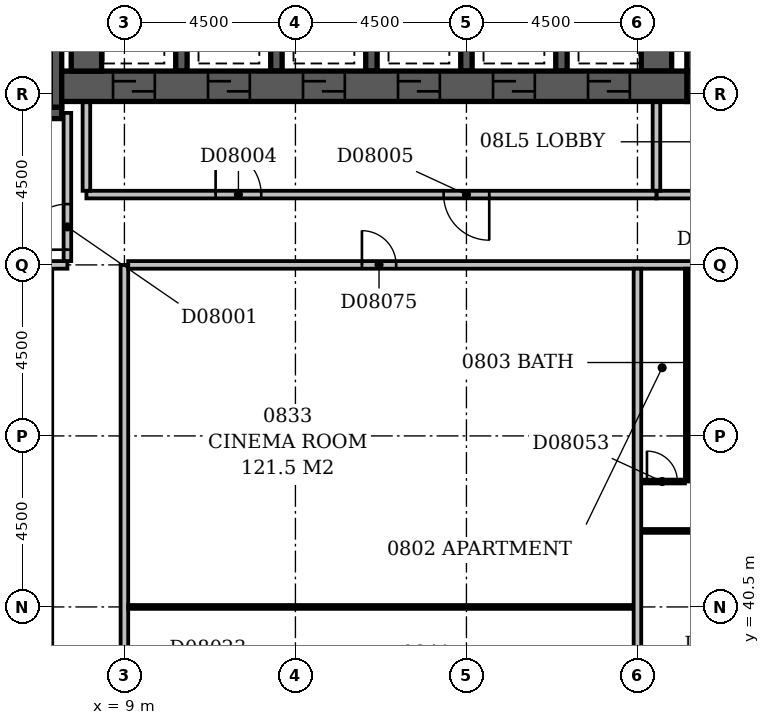
"""IFC4 building model, lengths in metres.
Left out: names, types, materials, properties, quantities, classifications, styles, units other than length and angle.
Written with IfcOpenShell. Run it as: python <this file> out.ifc"""

import sys

from ifc_helpers import new_model, si_unit, direction, frame, frame_2d, origin, place, context, subcontext, project, spatial, rectangle, extrude, element, fill, save


model = new_model("IFC4")
c1 = context("Model", 3, precision=1e-05, world=origin(), true_north=direction((0.0, 1.0)))
c2 = subcontext(c1, "Body", "Model", "MODEL_VIEW")
j1 = project(units=[si_unit("LENGTHUNIT", "METRE"), si_unit("PLANEANGLEUNIT", "RADIAN")], contexts=[c1])
p1 = place(None, origin())
s1 = spatial("IfcSite", under=j1, at=p1, CompositionType="ELEMENT")
p2 = place(p1, origin())
s2 = spatial("IfcBuilding", under=s1, at=p2, CompositionType="ELEMENT")
p3 = place(p2, frame((0.0, 0.0, 39.8)))
s3 = spatial("IfcBuildingStorey", under=s2, at=p3, CompositionType="ELEMENT", Elevation=39.8)
p4 = place(p3, frame((0.35, 53.5, -0.3), z_axis=(0.0, 0.0, 1.0), x_axis=(1.0, 0.0, 0.0)))
e1 = element("IfcWall", 1, at=p4, inside=s3, PredefinedType="SHEAR", context=c2, shape_type="SweptSolid", body=[
    extrude(rectangle(XDim=7.0, YDim=0.3, at=frame_2d((3.5, 0.0))), origin(), (0.0, 0.0, 1.0), 3.6),
])
p5 = place(p4, frame((5.58, 0.0, 0.3)))
e2 = element("IfcOpeningElement", 2, at=p5, cuts=e1, PredefinedType="OPENING", context=c2, shape_type="SweptSolid", body=[
    extrude(rectangle(XDim=1.1, YDim=2.1, at=frame_2d((0.55, 1.05))), frame((0.0, 0.162, 0.0), z_axis=(0.0, -1.0, 0.0), x_axis=(1.0, 0.0, 0.0)), (0.0, 0.0, 1.0), 0.324),
])
p6 = place(p3, frame((7.2, 53.65, -0.3), z_axis=(0.0, 0.0, 1.0), x_axis=(0.0, 1.0, 0.0)))
e3 = element("IfcWall", 3, at=p6, inside=s3, PredefinedType="SHEAR", context=c2, shape_type="SweptSolid", body=[
    extrude(rectangle(XDim=4.2, YDim=0.3, at=frame_2d((2.1, 0.0))), origin(), (0.0, 0.0, 1.0), 3.6),
])
p7 = place(p3, frame((7.35, 54.2, -0.3), z_axis=(0.0, 0.0, 1.0), x_axis=(1.0, 0.0, 0.0)))
e4 = element("IfcWall", 4, at=p7, inside=s3, PredefinedType="SHEAR", context=c2, shape_type="SweptSolid", body=[
    extrude(rectangle(XDim=16.45, YDim=0.8, at=frame_2d((8.225, 0.0))), origin(), (0.0, 0.0, 1.0), 3.6),
])
p8 = place(p7, frame((1.35, 0.0, 0.3)))
e5 = element("IfcOpeningElement", 5, at=p8, cuts=e4, PredefinedType="OPENING", context=c2, shape_type="SweptSolid", body=[
    extrude(rectangle(XDim=1.1, YDim=2.1, at=frame_2d((0.55, 1.05))), frame((0.0, 0.412, 0.0), z_axis=(0.0, -1.0, 0.0), x_axis=(1.0, 0.0, 0.0)), (0.0, 0.0, 1.0), 0.824),
])
p9 = place(p7, frame((3.85, 0.0, 0.3)))
e6 = element("IfcOpeningElement", 6, at=p9, cuts=e4, PredefinedType="OPENING", context=c2, shape_type="SweptSolid", body=[
    extrude(rectangle(XDim=1.1, YDim=2.1, at=frame_2d((0.55, 1.05))), frame((0.0, 0.412, 0.0), z_axis=(0.0, -1.0, 0.0), x_axis=(1.0, 0.0, 0.0)), (0.0, 0.0, 1.0), 0.824),
])
p10 = place(p7, frame((6.35, 0.0, 0.3)))
e7 = element("IfcOpeningElement", 7, at=p10, cuts=e4, PredefinedType="OPENING", context=c2, shape_type="SweptSolid", body=[
    extrude(rectangle(XDim=1.1, YDim=2.1, at=frame_2d((0.55, 1.05))), frame((0.0, 0.412, 0.0), z_axis=(0.0, -1.0, 0.0), x_axis=(1.0, 0.0, 0.0)), (0.0, 0.0, 1.0), 0.824),
])
p11 = place(p7, frame((8.85, 0.0, 0.3)))
e8 = element("IfcOpeningElement", 8, at=p11, cuts=e4, PredefinedType="OPENING", context=c2, shape_type="SweptSolid", body=[
    extrude(rectangle(XDim=1.1, YDim=2.1, at=frame_2d((0.55, 1.05))), frame((0.0, 0.412, 0.0), z_axis=(0.0, -1.0, 0.0), x_axis=(1.0, 0.0, 0.0)), (0.0, 0.0, 1.0), 0.824),
])
p12 = place(p7, frame((11.35, 0.0, 0.3)))
e9 = element("IfcOpeningElement", 9, at=p12, cuts=e4, PredefinedType="OPENING", context=c2, shape_type="SweptSolid", body=[
    extrude(rectangle(XDim=1.1, YDim=2.1, at=frame_2d((0.55, 1.05))), frame((0.0, 0.412, 0.0), z_axis=(0.0, -1.0, 0.0), x_axis=(1.0, 0.0, 0.0)), (0.0, 0.0, 1.0), 0.824),
])
p13 = place(p7, frame((13.85, 0.0, 0.3)))
e10 = element("IfcOpeningElement", 10, at=p13, cuts=e4, PredefinedType="OPENING", context=c2, shape_type="SweptSolid", body=[
    extrude(rectangle(XDim=1.1, YDim=2.1, at=frame_2d((0.55, 1.05))), frame((0.0, 0.412, 0.0), z_axis=(0.0, -1.0, 0.0), x_axis=(1.0, 0.0, 0.0)), (0.0, 0.0, 1.0), 0.824),
])
p14 = place(p3, frame((8.0, 54.6, -0.3), z_axis=(0.0, 0.0, 1.0), x_axis=(0.0, 1.0, 0.0)))
e11 = element("IfcWall", 11, at=p14, inside=s3, PredefinedType="SHEAR", context=c2, shape_type="SweptSolid", body=[
    extrude(rectangle(XDim=3.0, YDim=0.8, at=frame_2d((1.5, 0.0))), origin(), (0.0, 0.0, 1.0), 3.6),
])
for number, where, z_axis, x_axis in (
    (12, (10.5, 54.6, -0.3), (0.0, 0.0, 1.0), (0.0, 1.0, 0.0)),
    (13, (13.0, 54.6, -0.3), (0.0, 0.0, 1.0), (0.0, 1.0, 0.0)),
    (14, (15.5, 54.6, -0.3), (0.0, 0.0, 1.0), (0.0, 1.0, 0.0)),
    (15, (18.0, 54.6, -0.3), (0.0, 0.0, 1.0), (0.0, 1.0, 0.0)),
    (16, (20.5, 54.6, -0.3), (0.0, 0.0, 1.0), (0.0, 1.0, 0.0)),
):
    element("IfcWall", number, at=place(p3, frame(where, z_axis=z_axis, x_axis=x_axis)), inside=s3, PredefinedType="SHEAR", context=c2, shape_type="SweptSolid", body=[
        extrude(rectangle(XDim=3.0, YDim=0.3, at=frame_2d((1.5, 0.0))), origin(), (0.0, 0.0, 1.0), 3.6),
    ])
p15 = place(p3, frame((23.0, 54.6, -0.3), z_axis=(0.0, 0.0, 1.0), x_axis=(0.0, 1.0, 0.0)))
e17 = element("IfcWall", 17, at=p15, inside=s3, PredefinedType="SHEAR", context=c2, shape_type="SweptSolid", body=[
    extrude(rectangle(XDim=3.0, YDim=0.8, at=frame_2d((1.5, 0.0))), origin(), (0.0, 0.0, 1.0), 3.6),
])
p16 = place(p3, frame((23.8, 54.2, -0.3), z_axis=(0.0, 0.0, 1.0), x_axis=(1.0, 0.0, 0.0)))
e18 = element("IfcWall", 18, at=p16, inside=s3, PredefinedType="SHEAR", context=c2, shape_type="SweptSolid", body=[
    extrude(rectangle(XDim=3.3, YDim=0.8, at=frame_2d((1.65, 0.0))), origin(), (0.0, 0.0, 1.0), 3.6),
])
p17 = place(p16, frame((1.1, 0.0, 0.3)))
e19 = element("IfcOpeningElement", 19, at=p17, cuts=e18, PredefinedType="OPENING", context=c2, shape_type="SweptSolid", body=[
    extrude(rectangle(XDim=1.1, YDim=2.1, at=frame_2d((0.55, 1.05))), frame((0.0, 0.412, 0.0), z_axis=(0.0, -1.0, 0.0), x_axis=(1.0, 0.0, 0.0)), (0.0, 0.0, 1.0), 0.824),
])
p18 = place(p3, frame((24.2, 54.6, -0.3), z_axis=(0.0, 0.0, 1.0), x_axis=(0.0, 1.0, 0.0)))
e20 = element("IfcWall", 20, at=p18, inside=s3, PredefinedType="SHEAR", context=c2, shape_type="SweptSolid", body=[
    extrude(rectangle(XDim=3.0, YDim=0.8, at=frame_2d((1.5, 0.0))), origin(), (0.0, 0.0, 1.0), 3.6),
])
p19 = place(p3, frame((8.0, 51.35, 0.0), z_axis=(0.0, 0.0, 1.0), x_axis=(1.0, 0.0, 0.0)))
e21 = element("IfcWall", 21, at=p19, inside=s3, PredefinedType="PARTITIONING", context=c2, shape_type="SweptSolid", body=[
    extrude(rectangle(XDim=15.0, YDim=0.2, at=frame_2d((7.5, 0.0))), origin(), (0.0, 0.0, 1.0), 3.3),
])
p20 = place(p19, frame((3.4, 0.0, 0.0)))
e22 = element("IfcOpeningElement", 22, at=p20, cuts=e21, PredefinedType="OPENING", context=c2, shape_type="SweptSolid", body=[
    extrude(rectangle(XDim=1.2, YDim=2.1, at=frame_2d((0.6, 1.05))), frame((0.0, 0.112, 0.0), z_axis=(0.0, -1.0, 0.0), x_axis=(1.0, 0.0, 0.0)), (0.0, 0.0, 1.0), 0.224),
])
p21 = place(p19, frame((9.4, 0.0, 0.0)))
e23 = element("IfcOpeningElement", 23, at=p21, cuts=e21, PredefinedType="OPENING", context=c2, shape_type="SweptSolid", body=[
    extrude(rectangle(XDim=1.2, YDim=2.1, at=frame_2d((0.6, 1.05))), frame((0.0, 0.112, 0.0), z_axis=(0.0, -1.0, 0.0), x_axis=(1.0, 0.0, 0.0)), (0.0, 0.0, 1.0), 0.224),
])
for number, where, z_axis, x_axis in (
    (24, (23.0, 51.45, 0.0), (0.0, 0.0, 1.0), (0.0, 1.0, 0.0)),
    (25, (8.0, 51.45, 0.0), (0.0, 0.0, 1.0), (0.0, 1.0, 0.0)),
):
    element("IfcWall", number, at=place(p3, frame(where, z_axis=z_axis, x_axis=x_axis)), inside=s3, PredefinedType="PARTITIONING", context=c2, shape_type="SweptSolid", body=[
        extrude(rectangle(XDim=2.33, YDim=0.2, at=frame_2d((1.165, 0.0))), origin(), (0.0, 0.0, 1.0), 3.3),
    ])
p22 = place(p3, frame((23.0, 51.35, 0.0), z_axis=(0.0, 0.0, 1.0), x_axis=(1.0, 0.0, 0.0)))
e26 = element("IfcWall", 26, at=p22, inside=s3, PredefinedType="PARTITIONING", context=c2, shape_type="SweptSolid", body=[
    extrude(rectangle(XDim=4.8, YDim=0.2, at=frame_2d((2.4, 0.0))), origin(), (0.0, 0.0, 1.0), 3.3),
])
p23 = place(p22, frame((1.65, 0.0, 0.0)))
e27 = element("IfcOpeningElement", 27, at=p23, cuts=e26, PredefinedType="OPENING", context=c2, shape_type="SweptSolid", body=[
    extrude(rectangle(XDim=1.2, YDim=2.1, at=frame_2d((0.6, 1.05))), frame((0.0, 0.112, 0.0), z_axis=(0.0, -1.0, 0.0), x_axis=(1.0, 0.0, 0.0)), (0.0, 0.0, 1.0), 0.224),
])
p24 = place(p3, frame((0.5, 49.5, 0.0), z_axis=(0.0, 0.0, 1.0), x_axis=(1.0, 0.0, 0.0)))
e28 = element("IfcWall", 28, at=p24, inside=s3, PredefinedType="PARTITIONING", context=c2, shape_type="SweptSolid", body=[
    extrude(rectangle(XDim=7.0, YDim=0.2, at=frame_2d((3.5, 0.0))), origin(), (0.0, 0.0, 1.0), 3.3),
])
p25 = place(p3, frame((7.5, 49.6, 0.0), z_axis=(0.0, 0.0, 1.0), x_axis=(0.0, 1.0, 0.0)))
e29 = element("IfcWall", 29, at=p25, inside=s3, PredefinedType="PARTITIONING", context=c2, shape_type="SweptSolid", body=[
    extrude(rectangle(XDim=3.9, YDim=0.2, at=frame_2d((1.95, 0.0))), origin(), (0.0, 0.0, 1.0), 3.3),
])
p26 = place(p25, frame((0.3, 0.0, 0.0)))
e30 = element("IfcOpeningElement", 30, at=p26, cuts=e29, PredefinedType="OPENING", context=c2, shape_type="SweptSolid", body=[
    extrude(rectangle(XDim=1.2, YDim=2.1, at=frame_2d((0.6, 1.05))), frame((0.0, 0.112, 0.0), z_axis=(0.0, -1.0, 0.0), x_axis=(1.0, 0.0, 0.0)), (0.0, 0.0, 1.0), 0.224),
])
p27 = place(p3, frame((9.0, 5.0, 0.0), z_axis=(0.0, 0.0, 1.0), x_axis=(0.0, 1.0, 0.0)))
e31 = element("IfcWall", 31, at=p27, inside=s3, PredefinedType="PARTITIONING", context=c2, shape_type="SweptSolid", body=[
    extrude(rectangle(XDim=44.5, YDim=0.2, at=frame_2d((22.25, 0.0))), origin(), (0.0, 0.0, 1.0), 3.3),
])
p28 = place(p27, frame((17.8, 0.0, 0.0)))
e32 = element("IfcOpeningElement", 32, at=p28, cuts=e31, PredefinedType="OPENING", context=c2, shape_type="SweptSolid", body=[
    extrude(rectangle(XDim=1.0, YDim=2.1, at=frame_2d((0.5, 1.05))), frame((0.0, 0.112, 0.0), z_axis=(0.0, -1.0, 0.0), x_axis=(1.0, 0.0, 0.0)), (0.0, 0.0, 1.0), 0.224),
])
p29 = place(p27, frame((14.95, 0.0, 0.0)))
e33 = element("IfcOpeningElement", 33, at=p29, cuts=e31, PredefinedType="OPENING", context=c2, shape_type="SweptSolid", body=[
    extrude(rectangle(XDim=1.0, YDim=2.1, at=frame_2d((0.5, 1.05))), frame((0.0, 0.112, 0.0), z_axis=(0.0, -1.0, 0.0), x_axis=(1.0, 0.0, 0.0)), (0.0, 0.0, 1.0), 0.224),
])
p30 = place(p27, frame((10.45, 0.0, 0.0)))
e34 = element("IfcOpeningElement", 34, at=p30, cuts=e31, PredefinedType="OPENING", context=c2, shape_type="SweptSolid", body=[
    extrude(rectangle(XDim=1.0, YDim=2.1, at=frame_2d((0.5, 1.05))), frame((0.0, 0.112, 0.0), z_axis=(0.0, -1.0, 0.0), x_axis=(1.0, 0.0, 0.0)), (0.0, 0.0, 1.0), 0.224),
])
p31 = place(p27, frame((5.95, 0.0, 0.0)))
e35 = element("IfcOpeningElement", 35, at=p31, cuts=e31, PredefinedType="OPENING", context=c2, shape_type="SweptSolid", body=[
    extrude(rectangle(XDim=1.0, YDim=2.1, at=frame_2d((0.5, 1.05))), frame((0.0, 0.112, 0.0), z_axis=(0.0, -1.0, 0.0), x_axis=(1.0, 0.0, 0.0)), (0.0, 0.0, 1.0), 0.224),
])
p32 = place(p27, frame((32.75, 0.0, 0.0)))
e36 = element("IfcOpeningElement", 36, at=p32, cuts=e31, PredefinedType="OPENING", context=c2, shape_type="SweptSolid", body=[
    extrude(rectangle(XDim=0.9, YDim=2.1, at=frame_2d((0.45, 1.05))), frame((0.0, 0.112, 0.0), z_axis=(0.0, -1.0, 0.0), x_axis=(1.0, 0.0, 0.0)), (0.0, 0.0, 1.0), 0.224),
])
p33 = place(p27, frame((1.5, 0.0, 0.0)))
e37 = element("IfcOpeningElement", 37, at=p33, cuts=e31, PredefinedType="OPENING", context=c2, shape_type="SweptSolid", body=[
    extrude(rectangle(XDim=0.9, YDim=2.1, at=frame_2d((0.45, 1.05))), frame((0.0, 0.112, 0.0), z_axis=(0.0, -1.0, 0.0), x_axis=(1.0, 0.0, 0.0)), (0.0, 0.0, 1.0), 0.224),
])
p34 = place(p3, frame((22.5, 36.6, 0.0), z_axis=(0.0, 0.0, 1.0), x_axis=(0.0, 1.0, 0.0)))
e38 = element("IfcWall", 38, at=p34, inside=s3, PredefinedType="PARTITIONING", context=c2, shape_type="SweptSolid", body=[
    extrude(rectangle(XDim=12.8, YDim=0.2, at=frame_2d((6.4, 0.0))), origin(), (0.0, 0.0, 1.0), 3.3),
])
p35 = place(p3, frame((9.1, 40.5, 0.0), z_axis=(0.0, 0.0, 1.0), x_axis=(1.0, 0.0, 0.0)))
e39 = element("IfcWall", 39, at=p35, inside=s3, PredefinedType="PARTITIONING", context=c2, shape_type="SweptSolid", body=[
    extrude(rectangle(XDim=13.3, YDim=0.1, at=frame_2d((6.65, 0.0))), origin(), (0.0, 0.0, 1.0), 3.3),
])
p36 = place(p3, frame((22.6, 42.5, 0.0), z_axis=(0.0, 0.0, 1.0), x_axis=(1.0, 0.0, 0.0)))
e40 = element("IfcWall", 40, at=p36, inside=s3, PredefinedType="PARTITIONING", context=c2, shape_type="SweptSolid", body=[
    extrude(rectangle(XDim=4.3, YDim=0.1, at=frame_2d((2.15, 0.0))), origin(), (0.0, 0.0, 1.0), 3.3),
])
p37 = place(p36, frame((1.7, 0.0, 0.0)))
e41 = element("IfcOpeningElement", 41, at=p37, cuts=e40, PredefinedType="OPENING", context=c2, shape_type="SweptSolid", body=[
    extrude(rectangle(XDim=0.9, YDim=2.1, at=frame_2d((0.45, 1.05))), frame((0.0, 0.062, 0.0), z_axis=(0.0, -1.0, 0.0), x_axis=(1.0, 0.0, 0.0)), (0.0, 0.0, 1.0), 0.124),
])
p38 = place(p3, frame((22.6, 43.8, 0.0), z_axis=(0.0, 0.0, 1.0), x_axis=(1.0, 0.0, 0.0)))
e42 = element("IfcWall", 42, at=p38, inside=s3, PredefinedType="PARTITIONING", context=c2, shape_type="SweptSolid", body=[
    extrude(rectangle(XDim=1.15, YDim=0.1, at=frame_2d((0.575, 0.0))), origin(), (0.0, 0.0, 1.0), 3.3),
])
p39 = place(p38, frame((0.15, 0.0, 0.0)))
e43 = element("IfcOpeningElement", 43, at=p39, cuts=e42, PredefinedType="OPENING", context=c2, shape_type="SweptSolid", body=[
    extrude(rectangle(XDim=0.8, YDim=2.1, at=frame_2d((0.4, 1.05))), frame((0.0, 0.062, 0.0), z_axis=(0.0, -1.0, 0.0), x_axis=(1.0, 0.0, 0.0)), (0.0, 0.0, 1.0), 0.124),
])
p40 = place(p3, frame((23.8, 43.8, 0.0), z_axis=(0.0, 0.0, 1.0), x_axis=(0.0, 1.0, 0.0)))
e44 = element("IfcWall", 44, at=p40, inside=s3, PredefinedType="PARTITIONING", context=c2, shape_type="SweptSolid", body=[
    extrude(rectangle(XDim=5.6, YDim=0.1, at=frame_2d((2.8, 0.0))), origin(), (0.0, 0.0, 1.0), 3.3),
])
p41 = place(p3, frame((9.1, 49.5, 0.0), z_axis=(0.0, 0.0, 1.0), x_axis=(1.0, 0.0, 0.0)))
e45 = element("IfcWall", 45, at=p41, inside=s3, PredefinedType="PARTITIONING", context=c2, shape_type="SweptSolid", body=[
    extrude(rectangle(XDim=57.8, YDim=0.2, at=frame_2d((28.9, 0.0))), origin(), (0.0, 0.0, 1.0), 3.3),
])
p42 = place(p41, frame((14.95, 0.0, 0.0)))
e46 = element("IfcOpeningElement", 46, at=p42, cuts=e45, PredefinedType="OPENING", context=c2, shape_type="SweptSolid", body=[
    extrude(rectangle(XDim=1.0, YDim=2.1, at=frame_2d((0.5, 1.05))), frame((0.0, 0.112, 0.0), z_axis=(0.0, -1.0, 0.0), x_axis=(1.0, 0.0, 0.0)), (0.0, 0.0, 1.0), 0.224),
])
p43 = place(p41, frame((19.85, 0.0, 0.0)))
e47 = element("IfcOpeningElement", 47, at=p43, cuts=e45, PredefinedType="OPENING", context=c2, shape_type="SweptSolid", body=[
    extrude(rectangle(XDim=1.0, YDim=2.1, at=frame_2d((0.5, 1.05))), frame((0.0, 0.112, 0.0), z_axis=(0.0, -1.0, 0.0), x_axis=(1.0, 0.0, 0.0)), (0.0, 0.0, 1.0), 0.224),
])
p44 = place(p41, frame((22.7, 0.0, 0.0)))
e48 = element("IfcOpeningElement", 48, at=p44, cuts=e45, PredefinedType="OPENING", context=c2, shape_type="SweptSolid", body=[
    extrude(rectangle(XDim=1.0, YDim=2.1, at=frame_2d((0.5, 1.05))), frame((0.0, 0.112, 0.0), z_axis=(0.0, -1.0, 0.0), x_axis=(1.0, 0.0, 0.0)), (0.0, 0.0, 1.0), 0.224),
])
p45 = place(p41, frame((33.35, 0.0, 0.0)))
e49 = element("IfcOpeningElement", 49, at=p45, cuts=e45, PredefinedType="OPENING", context=c2, shape_type="SweptSolid", body=[
    extrude(rectangle(XDim=1.0, YDim=2.1, at=frame_2d((0.5, 1.05))), frame((0.0, 0.112, 0.0), z_axis=(0.0, -1.0, 0.0), x_axis=(1.0, 0.0, 0.0)), (0.0, 0.0, 1.0), 0.224),
])
p46 = place(p41, frame((36.2, 0.0, 0.0)))
e50 = element("IfcOpeningElement", 50, at=p46, cuts=e45, PredefinedType="OPENING", context=c2, shape_type="SweptSolid", body=[
    extrude(rectangle(XDim=1.0, YDim=2.1, at=frame_2d((0.5, 1.05))), frame((0.0, 0.112, 0.0), z_axis=(0.0, -1.0, 0.0), x_axis=(1.0, 0.0, 0.0)), (0.0, 0.0, 1.0), 0.224),
])
p47 = place(p41, frame((54.15, 0.0, 0.0)))
e51 = element("IfcOpeningElement", 51, at=p47, cuts=e45, PredefinedType="OPENING", context=c2, shape_type="SweptSolid", body=[
    extrude(rectangle(XDim=1.0, YDim=2.1, at=frame_2d((0.5, 1.05))), frame((0.0, 0.112, 0.0), z_axis=(0.0, -1.0, 0.0), x_axis=(1.0, 0.0, 0.0)), (0.0, 0.0, 1.0), 0.224),
])
p48 = place(p41, frame((6.15, 0.0, 0.0)))
e52 = element("IfcOpeningElement", 52, at=p48, cuts=e45, PredefinedType="OPENING", context=c2, shape_type="SweptSolid", body=[
    extrude(rectangle(XDim=0.9, YDim=2.1, at=frame_2d((0.45, 1.05))), frame((0.0, 0.112, 0.0), z_axis=(0.0, -1.0, 0.0), x_axis=(1.0, 0.0, 0.0)), (0.0, 0.0, 1.0), 0.224),
])
p49 = place(p26, origin())
e53 = element("IfcDoor", 53, at=p49, inside=s3, OperationType="SINGLE_SWING_LEFT", PredefinedType="DOOR", context=c2, shape_type="SweptSolid", body=[
    extrude(rectangle(XDim=1.2, YDim=2.1, at=frame_2d((0.6, 1.05))), frame((0.0, 0.025, 0.0), z_axis=(0.0, -1.0, 0.0), x_axis=(1.0, 0.0, 0.0)), (0.0, 0.0, 1.0), 0.05),
])
fill(e30, e53)
p50 = place(p8, origin())
e54 = element("IfcDoor", 54, at=p50, inside=s3, OperationType="SLIDING_TO_LEFT", PredefinedType="DOOR", context=c2, shape_type="SweptSolid", body=[
    extrude(rectangle(XDim=1.1, YDim=2.1, at=frame_2d((0.55, 1.05))), frame((0.0, 0.025, 0.0), z_axis=(0.0, -1.0, 0.0), x_axis=(1.0, 0.0, 0.0)), (0.0, 0.0, 1.0), 0.05),
])
fill(e5, e54)
p51 = place(p9, origin())
e55 = element("IfcDoor", 55, at=p51, inside=s3, OperationType="SLIDING_TO_LEFT", PredefinedType="DOOR", context=c2, shape_type="SweptSolid", body=[
    extrude(rectangle(XDim=1.1, YDim=2.1, at=frame_2d((0.55, 1.05))), frame((0.0, 0.025, 0.0), z_axis=(0.0, -1.0, 0.0), x_axis=(1.0, 0.0, 0.0)), (0.0, 0.0, 1.0), 0.05),
])
fill(e6, e55)
p52 = place(p10, origin())
e56 = element("IfcDoor", 56, at=p52, inside=s3, OperationType="SLIDING_TO_LEFT", PredefinedType="DOOR", context=c2, shape_type="SweptSolid", body=[
    extrude(rectangle(XDim=1.1, YDim=2.1, at=frame_2d((0.55, 1.05))), frame((0.0, 0.025, 0.0), z_axis=(0.0, -1.0, 0.0), x_axis=(1.0, 0.0, 0.0)), (0.0, 0.0, 1.0), 0.05),
])
fill(e7, e56)
p53 = place(p11, origin())
e57 = element("IfcDoor", 57, at=p53, inside=s3, OperationType="SLIDING_TO_LEFT", PredefinedType="DOOR", context=c2, shape_type="SweptSolid", body=[
    extrude(rectangle(XDim=1.1, YDim=2.1, at=frame_2d((0.55, 1.05))), frame((0.0, 0.025, 0.0), z_axis=(0.0, -1.0, 0.0), x_axis=(1.0, 0.0, 0.0)), (0.0, 0.0, 1.0), 0.05),
])
fill(e8, e57)
p54 = place(p12, origin())
e58 = element("IfcDoor", 58, at=p54, inside=s3, OperationType="SLIDING_TO_LEFT", PredefinedType="DOOR", context=c2, shape_type="SweptSolid", body=[
    extrude(rectangle(XDim=1.1, YDim=2.1, at=frame_2d((0.55, 1.05))), frame((0.0, 0.025, 0.0), z_axis=(0.0, -1.0, 0.0), x_axis=(1.0, 0.0, 0.0)), (0.0, 0.0, 1.0), 0.05),
])
fill(e9, e58)
p55 = place(p13, origin())
e59 = element("IfcDoor", 59, at=p55, inside=s3, OperationType="SLIDING_TO_LEFT", PredefinedType="DOOR", context=c2, shape_type="SweptSolid", body=[
    extrude(rectangle(XDim=1.1, YDim=2.1, at=frame_2d((0.55, 1.05))), frame((0.0, 0.025, 0.0), z_axis=(0.0, -1.0, 0.0), x_axis=(1.0, 0.0, 0.0)), (0.0, 0.0, 1.0), 0.05),
])
fill(e10, e59)
p56 = place(p20, origin())
e60 = element("IfcDoor", 60, at=p56, inside=s3, OperationType="SINGLE_SWING_LEFT", PredefinedType="DOOR", context=c2, shape_type="SweptSolid", body=[
    extrude(rectangle(XDim=1.2, YDim=2.1, at=frame_2d((0.6, 1.05))), frame((0.0, 0.025, 0.0), z_axis=(0.0, -1.0, 0.0), x_axis=(1.0, 0.0, 0.0)), (0.0, 0.0, 1.0), 0.05),
])
fill(e22, e60)
p57 = place(p21, origin())
e61 = element("IfcDoor", 61, at=p57, inside=s3, OperationType="SINGLE_SWING_RIGHT", PredefinedType="DOOR", context=c2, shape_type="SweptSolid", body=[
    extrude(rectangle(XDim=1.2, YDim=2.1, at=frame_2d((0.6, 1.05))), frame((0.0, 0.025, 0.0), z_axis=(0.0, -1.0, 0.0), x_axis=(1.0, 0.0, 0.0)), (0.0, 0.0, 1.0), 0.05),
])
fill(e23, e61)
p58 = place(p39, origin())
e62 = element("IfcDoor", 62, at=p58, inside=s3, OperationType="SINGLE_SWING_LEFT", PredefinedType="DOOR", context=c2, shape_type="SweptSolid", body=[
    extrude(rectangle(XDim=0.8, YDim=2.1, at=frame_2d((0.4, 1.05))), frame((0.0, 0.025, 0.0), z_axis=(0.0, -1.0, 0.0), x_axis=(1.0, 0.0, 0.0)), (0.0, 0.0, 1.0), 0.05),
])
fill(e43, e62)
p59 = place(p48, origin())
e63 = element("IfcDoor", 63, at=p59, inside=s3, OperationType="SINGLE_SWING_LEFT", PredefinedType="DOOR", context=c2, shape_type="SweptSolid", body=[
    extrude(rectangle(XDim=0.9, YDim=2.1, at=frame_2d((0.45, 1.05))), frame((0.0, 0.025, 0.0), z_axis=(0.0, -1.0, 0.0), x_axis=(1.0, 0.0, 0.0)), (0.0, 0.0, 1.0), 0.05),
])
fill(e52, e63)
save(model, sys.argv[1])
